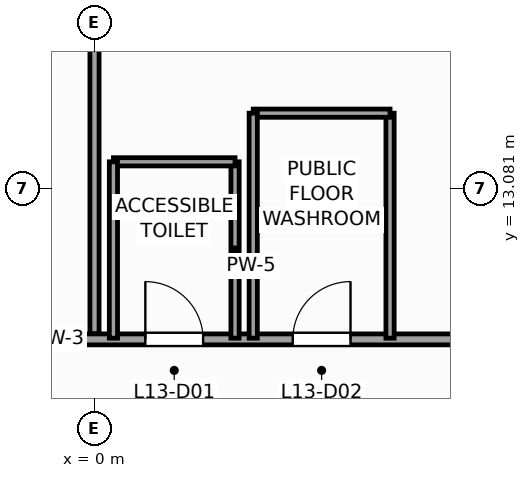
"""IFC4 building model, lengths in metres.
Left out: names, types, materials, properties, quantities, classifications, styles, units other than length and angle.
Written with IfcOpenShell. Run it as: python <this file> out.ifc"""

import sys

from ifc_helpers import new_model, si_unit, direction, frame, frame_2d, origin, place, context, subcontext, project, spatial, rectangle, extrude, source, transform, mapped, element, fill, save


model = new_model("IFC4")
c1 = context("Model", 3, precision=1e-05, world=origin(), true_north=direction((0.0, 1.0)))
c2 = subcontext(c1, "Body", "Model", "MODEL_VIEW")
j1 = project(units=[si_unit("LENGTHUNIT", "METRE"), si_unit("PLANEANGLEUNIT", "RADIAN")], contexts=[c1])
p1 = place(None, origin())
s1 = spatial("IfcSite", under=j1, at=p1, CompositionType="ELEMENT")
p2 = place(p1, origin())
s2 = spatial("IfcBuilding", under=s1, at=p2, CompositionType="ELEMENT")
p3 = place(p2, frame((0.0, 0.0, 58.0)))
s3 = spatial("IfcBuildingStorey", under=s2, at=p3, CompositionType="ELEMENT", Elevation=58.0)
p4 = place(p3, frame((-11.75, 10.6, 0.0), z_axis=(0.0, 0.0, 1.0), x_axis=(1.0, 0.0, 0.0)))
e1 = element("IfcWall", 1, at=p4, inside=s3, PredefinedType="PARTITIONING", context=c2, shape_type="SweptSolid", body=[
    extrude(rectangle(XDim=22.35, YDim=0.18, at=frame_2d((11.175, 0.0))), origin(), (0.0, 0.0, 1.0), 3.72),
])
p5 = place(p4, frame((12.586, 0.0, 0.0)))
e2 = element("IfcOpeningElement", 2, at=p5, cuts=e1, PredefinedType="OPENING", context=c2, shape_type="SweptSolid", body=[
    extrude(rectangle(XDim=0.95, YDim=2.1, at=frame_2d((0.475, 1.05))), frame((0.0, 0.1, 0.0), z_axis=(0.0, -1.0, 0.0), x_axis=(1.0, 0.0, 0.0)), (0.0, 0.0, 1.0), 0.2),
])
p6 = place(p4, frame((15.01, 0.0, 0.0)))
e3 = element("IfcOpeningElement", 3, at=p6, cuts=e1, PredefinedType="OPENING", context=c2, shape_type="SweptSolid", body=[
    extrude(rectangle(XDim=0.95, YDim=2.1, at=frame_2d((0.475, 1.05))), frame((0.0, 0.1, 0.0), z_axis=(0.0, -1.0, 0.0), x_axis=(1.0, 0.0, 0.0)), (0.0, 0.0, 1.0), 0.2),
])
p7 = place(p3, frame((0.0, 10.695, 0.0), z_axis=(0.0, 0.0, 1.0), x_axis=(0.0, 1.0, 0.0)))
e4 = element("IfcWall", 4, at=p7, inside=s3, PredefinedType="PARTITIONING", context=c2, shape_type="SweptSolid", body=[
    extrude(rectangle(XDim=17.99, YDim=0.15, at=frame_2d((8.995, 0.0))), origin(), (0.0, 0.0, 1.0), 3.72),
])
p8 = place(p3, frame((2.311, 10.62, 0.0), z_axis=(0.0, 0.0, 1.0), x_axis=(0.0, 1.0, 0.0)))
e5 = element("IfcWall", 5, at=p8, inside=s3, PredefinedType="PARTITIONING", context=c2, shape_type="SweptSolid", body=[
    extrude(rectangle(XDim=2.9, YDim=0.135, at=frame_2d((1.45, 0.0))), origin(), (0.0, 0.0, 1.0), 3.72),
])
p9 = place(p3, frame((0.311, 13.52, 0.0), z_axis=(0.0, 0.0, 1.0), x_axis=(1.0, 0.0, 0.0)))
e6 = element("IfcWall", 6, at=p9, inside=s3, PredefinedType="PARTITIONING", context=c2, shape_type="SweptSolid", body=[
    extrude(rectangle(XDim=2.0, YDim=0.135, at=frame_2d((1.0, 0.0))), origin(), (0.0, 0.0, 1.0), 3.72),
])
p10 = place(p3, frame((0.311, 10.62, 0.0), z_axis=(0.0, 0.0, 1.0), x_axis=(0.0, 1.0, 0.0)))
e7 = element("IfcWall", 7, at=p10, inside=s3, PredefinedType="PARTITIONING", context=c2, shape_type="SweptSolid", body=[
    extrude(rectangle(XDim=2.9, YDim=0.135, at=frame_2d((1.45, 0.0))), origin(), (0.0, 0.0, 1.0), 3.72),
])
p11 = place(p3, frame((4.86, 10.62, 0.0), z_axis=(0.0, 0.0, 1.0), x_axis=(0.0, 1.0, 0.0)))
e8 = element("IfcWall", 8, at=p11, inside=s3, PredefinedType="PARTITIONING", context=c2, shape_type="SweptSolid", body=[
    extrude(rectangle(XDim=3.7, YDim=0.135, at=frame_2d((1.85, 0.0))), origin(), (0.0, 0.0, 1.0), 3.72),
])
p12 = place(p3, frame((2.61, 14.32, 0.0), z_axis=(0.0, 0.0, 1.0), x_axis=(1.0, 0.0, 0.0)))
e9 = element("IfcWall", 9, at=p12, inside=s3, PredefinedType="PARTITIONING", context=c2, shape_type="SweptSolid", body=[
    extrude(rectangle(XDim=2.25, YDim=0.135, at=frame_2d((1.125, 0.0))), origin(), (0.0, 0.0, 1.0), 3.72),
])
p13 = place(p3, frame((2.61, 10.62, 0.0), z_axis=(0.0, 0.0, 1.0), x_axis=(0.0, 1.0, 0.0)))
e10 = element("IfcWall", 10, at=p13, inside=s3, PredefinedType="PARTITIONING", context=c2, shape_type="SweptSolid", body=[
    extrude(rectangle(XDim=3.7, YDim=0.135, at=frame_2d((1.85, 0.0))), origin(), (0.0, 0.0, 1.0), 3.72),
])
m1 = source(origin(), c2, "Body", "SweptSolid", [
    extrude(rectangle(XDim=0.95, YDim=2.1, at=frame_2d((0.475, 1.05))), frame((0.0, 0.025, 0.0), z_axis=(0.0, -1.0, 0.0), x_axis=(1.0, 0.0, 0.0)), (0.0, 0.0, 1.0), 0.05),
])
p14 = place(p5, origin())
e11 = element("IfcDoor", 11, at=p14, inside=s3, OperationType="SINGLE_SWING_LEFT", PredefinedType="DOOR", context=c2, shape_type="MappedRepresentation", body=[
    mapped(m1, transform((0.0, 0.0, 0.0), scale=1.0)),
])
fill(e2, e11)
p15 = place(p6, origin())
e12 = element("IfcDoor", 12, at=p15, inside=s3, OperationType="SINGLE_SWING_RIGHT", PredefinedType="DOOR", context=c2, shape_type="MappedRepresentation", body=[
    mapped(m1, transform((0.0, 0.0, 0.0), scale=1.0)),
])
fill(e3, e12)
save(model, sys.argv[1])
